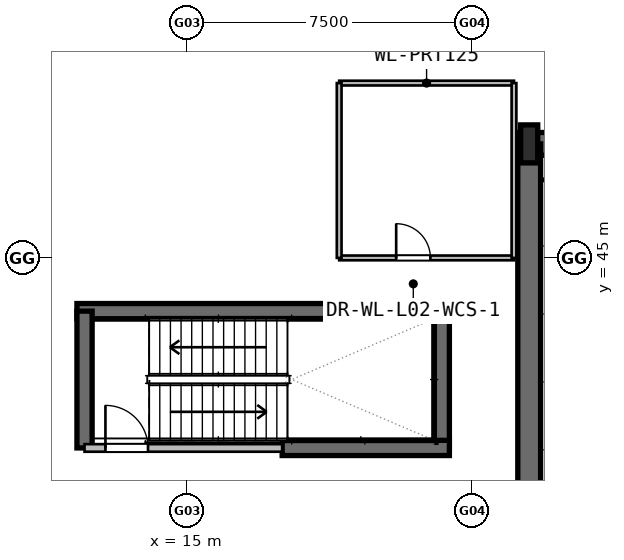
"""IFC4 building model, lengths in metres.
Left out: names, types, materials, properties, quantities, classifications, styles, units other than length and angle.
Written with IfcOpenShell. Run it as: python <this file> out.ifc"""

import sys

from ifc_helpers import new_model, si_unit, direction, frame, frame_2d, origin, origin_2d, place, context, subcontext, project, spatial, rectangle, i_section, extrude, element, fill, save


model = new_model("IFC4")
c1 = context("Model", 3, precision=1e-05, world=origin(), true_north=direction((0.0, 1.0)))
c2 = subcontext(c1, "Body", "Model", "MODEL_VIEW")
j1 = project(units=[si_unit("LENGTHUNIT", "METRE"), si_unit("PLANEANGLEUNIT", "RADIAN")], contexts=[c1])
p1 = place(None, origin())
s1 = spatial("IfcSite", under=j1, at=p1, CompositionType="ELEMENT")
p2 = place(p1, origin())
s2 = spatial("IfcBuilding", under=s1, at=p2, CompositionType="ELEMENT")
p3 = place(p2, frame((0.0, 0.0, 10.8)))
s3 = spatial("IfcBuildingStorey", under=s2, at=p3, CompositionType="ELEMENT", Elevation=10.8)
p4 = place(p3, frame((23.7, 48.0, 0.0), z_axis=(0.0, 0.0, 1.0), x_axis=(1.0, 0.0, 0.0)))
e1 = element("IfcWall", 1, at=p4, inside=s3, PredefinedType="SHEAR", context=c2, shape_type="SweptSolid", body=[
    extrude(rectangle(XDim=27.6, YDim=0.6, at=frame_2d((13.8, 0.0))), origin(), (0.0, 0.0, 1.0), 4.8),
])
p5 = place(p3, frame((24.0, 37.68, 0.0), z_axis=(0.0, 0.0, 1.0), x_axis=(0.0, 1.0, 0.0)))
e2 = element("IfcWall", 2, at=p5, inside=s3, PredefinedType="SHEAR", context=c2, shape_type="SweptSolid", body=[
    extrude(rectangle(XDim=10.32, YDim=0.6, at=frame_2d((5.16, 0.0))), origin(), (0.0, 0.0, 1.0), 4.8),
])
p6 = place(p3, frame((24.0, 48.0, 0.0), z_axis=(0.0, 0.0, 1.0), x_axis=(1.0, 0.0, 0.0)))
e3 = element("IfcColumn", 3, at=p6, inside=s3, PredefinedType="COLUMN", context=c2, shape_type="SweptSolid", body=[
    extrude(i_section(OverallWidth=0.45, OverallDepth=1.0, WebThickness=0.022, FlangeThickness=0.04, at=origin_2d()), origin(), (0.0, 0.0, 1.0), 4.8),
])
p7 = place(p3, frame((12.1, 43.6, 0.0), z_axis=(0.0, 0.0, 1.0), x_axis=(1.0, 0.0, 0.0)))
e4 = element("IfcWall", 4, at=p7, inside=s3, PredefinedType="SHEAR", context=c2, shape_type="SweptSolid", body=[
    extrude(rectangle(XDim=9.8, YDim=0.4, at=frame_2d((4.9, 0.0))), origin(), (0.0, 0.0, 1.0), 4.8),
])
for number, where, z_axis, x_axis in (
    (5, (12.3, 40.0, 0.0), (0.0, 0.0, 1.0), (0.0, 1.0, 0.0)),
    (6, (21.7, 40.0, 0.0), (0.0, 0.0, 1.0), (0.0, 1.0, 0.0)),
):
    element("IfcWall", number, at=place(p3, frame(where, z_axis=z_axis, x_axis=x_axis)), inside=s3, PredefinedType="SHEAR", context=c2, shape_type="SweptSolid", body=[
        extrude(rectangle(XDim=3.6, YDim=0.4, at=frame_2d((1.8, 0.0))), origin(), (0.0, 0.0, 1.0), 4.8),
    ])
p8 = place(p3, frame((17.5, 40.0, 0.0), z_axis=(0.0, 0.0, 1.0), x_axis=(1.0, 0.0, 0.0)))
e7 = element("IfcWall", 7, at=p8, inside=s3, PredefinedType="SHEAR", context=c2, shape_type="SweptSolid", body=[
    extrude(rectangle(XDim=4.4, YDim=0.4, at=frame_2d((2.2, 0.0))), origin(), (0.0, 0.0, 1.0), 4.8),
])
p9 = place(p3, frame((12.3, 40.0, 0.0), z_axis=(0.0, 0.0, 1.0), x_axis=(1.0, 0.0, 0.0)))
e8 = element("IfcWall", 8, at=p9, inside=s3, PredefinedType="PARTITIONING", context=c2, shape_type="SweptSolid", body=[
    extrude(rectangle(XDim=5.2, YDim=0.2, at=frame_2d((2.6, 0.0))), origin(), (0.0, 0.0, 1.0), 4.48),
])
p10 = place(p9, frame((0.55, 0.0, 0.0)))
e9 = element("IfcOpeningElement", 9, at=p10, cuts=e8, PredefinedType="OPENING", context=c2, shape_type="SweptSolid", body=[
    extrude(rectangle(XDim=1.12, YDim=2.1, at=frame_2d((0.56, 1.05))), frame((0.0, 0.11, 0.0), z_axis=(0.0, -1.0, 0.0), x_axis=(1.0, 0.0, 0.0)), (0.0, 0.0, 1.0), 0.22),
])
p11 = place(p3, frame((19.0, 45.0, 0.0), z_axis=(0.0, 0.0, 1.0), x_axis=(1.0, 0.0, 0.0)))
e10 = element("IfcWall", 10, at=p11, inside=s3, PredefinedType="PARTITIONING", context=c2, shape_type="SweptSolid", body=[
    extrude(rectangle(XDim=4.6, YDim=0.125, at=frame_2d((2.3, 0.0))), origin(), (0.0, 0.0, 1.0), 4.48),
])
p12 = place(p11, frame((1.5, 0.0, 0.0)))
e11 = element("IfcOpeningElement", 11, at=p12, cuts=e10, PredefinedType="OPENING", context=c2, shape_type="SweptSolid", body=[
    extrude(rectangle(XDim=0.9, YDim=2.05, at=frame_2d((0.45, 1.025))), frame((0.0, 0.073, 0.0), z_axis=(0.0, -1.0, 0.0), x_axis=(1.0, 0.0, 0.0)), (0.0, 0.0, 1.0), 0.145),
])
for number, where, z_axis, x_axis in (
    (12, (19.0, 49.6, 0.0), (0.0, 0.0, 1.0), (1.0, 0.0, 0.0)),
    (13, (19.0, 45.0, 0.0), (0.0, 0.0, 1.0), (0.0, 1.0, 0.0)),
    (14, (23.6, 45.0, 0.0), (0.0, 0.0, 1.0), (0.0, 1.0, 0.0)),
):
    element("IfcWall", number, at=place(p3, frame(where, z_axis=z_axis, x_axis=x_axis)), inside=s3, PredefinedType="PARTITIONING", context=c2, shape_type="SweptSolid", body=[
        extrude(rectangle(XDim=4.6, YDim=0.125, at=frame_2d((2.3, 0.0))), origin(), (0.0, 0.0, 1.0), 4.48),
    ])
p13 = place(p10, origin())
e15 = element("IfcDoor", 15, at=p13, inside=s3, OperationType="SINGLE_SWING_LEFT", PredefinedType="DOOR", context=c2, shape_type="SweptSolid", body=[
    extrude(rectangle(XDim=1.12, YDim=2.1, at=frame_2d((0.56, 1.05))), frame((0.0, 0.025, 0.0), z_axis=(0.0, -1.0, 0.0), x_axis=(1.0, 0.0, 0.0)), (0.0, 0.0, 1.0), 0.05),
])
fill(e9, e15)
p14 = place(p12, origin())
e16 = element("IfcDoor", 16, at=p14, inside=s3, OperationType="SINGLE_SWING_LEFT", PredefinedType="DOOR", context=c2, shape_type="SweptSolid", body=[
    extrude(rectangle(XDim=0.9, YDim=2.05, at=frame_2d((0.45, 1.025))), frame((0.0, 0.025, 0.0), z_axis=(0.0, -1.0, 0.0), x_axis=(1.0, 0.0, 0.0)), (0.0, 0.0, 1.0), 0.05),
])
fill(e11, e16)
save(model, sys.argv[1])
